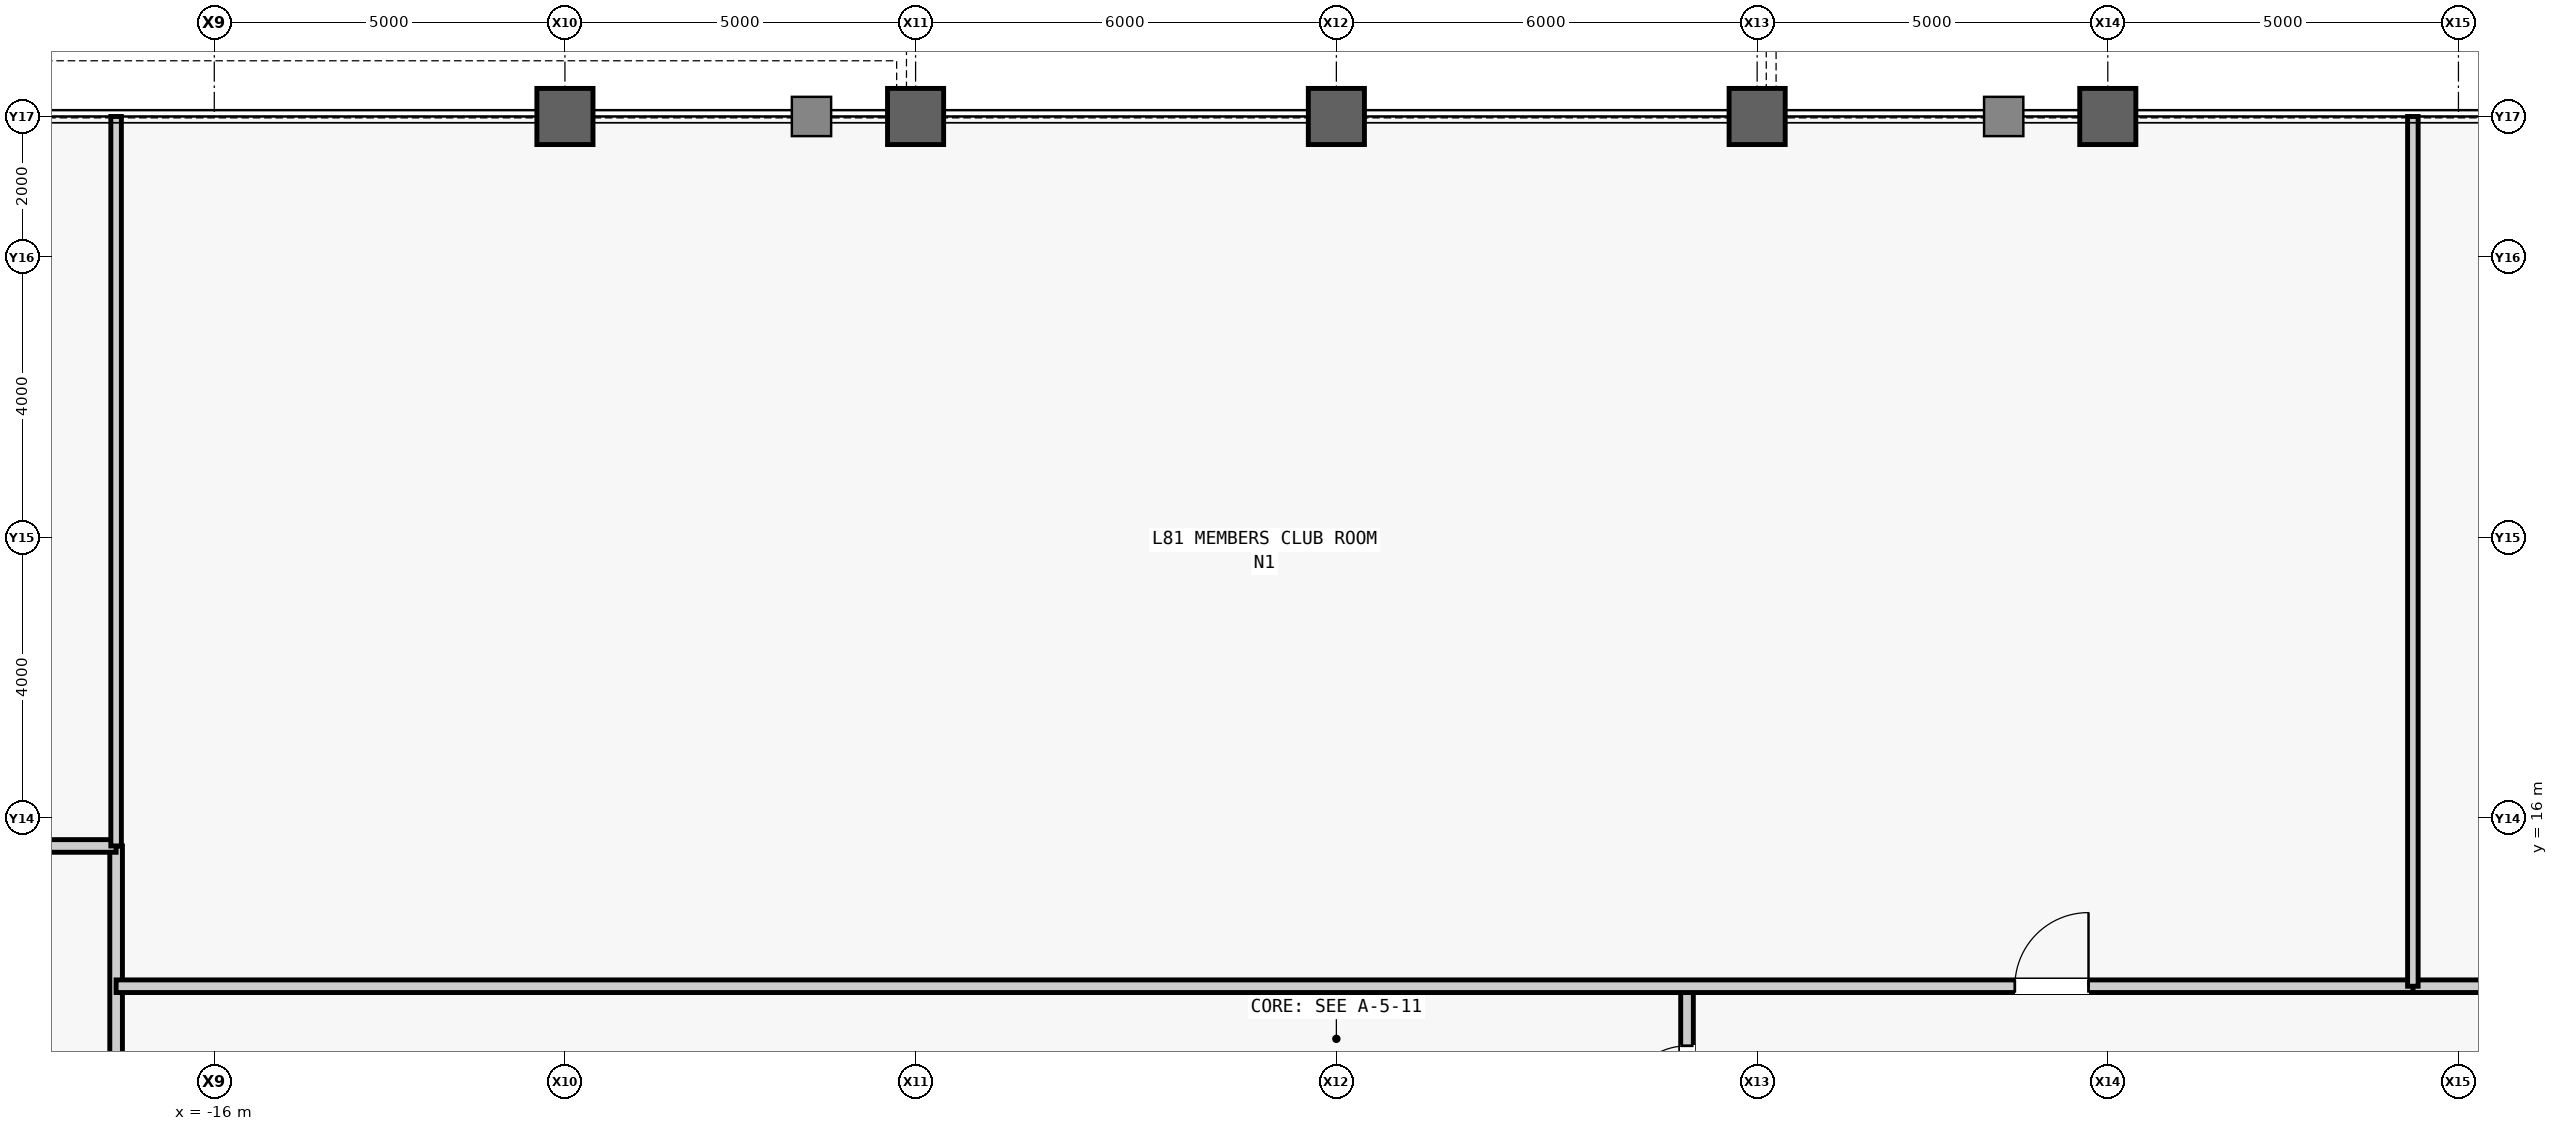
"""IFC4 building model, lengths in metres.
Left out: names, types, materials, properties, quantities, classifications, styles, units other than length and angle.
Written with IfcOpenShell. Run it as: python <this file> out.ifc"""

import sys

from ifc_helpers import new_model, si_unit, direction, frame, frame_2d, origin, origin_2d, place, context, subcontext, project, spatial, rectangle, hollow_rectangle, extrude, source, transform, mapped, element, fill, save


model = new_model("IFC4")
c1 = context("Model", 3, precision=1e-05, world=origin(), true_north=direction((0.0, 1.0)))
c2 = subcontext(c1, "Body", "Model", "MODEL_VIEW")
j1 = project(units=[si_unit("LENGTHUNIT", "METRE"), si_unit("PLANEANGLEUNIT", "RADIAN")], contexts=[c1])
p1 = place(None, origin())
s1 = spatial("IfcSite", under=j1, at=p1, CompositionType="ELEMENT")
p2 = place(p1, origin())
s2 = spatial("IfcBuilding", under=s1, at=p2, CompositionType="ELEMENT")
p3 = place(p2, frame((0.0, 0.0, 342.3)))
s3 = spatial("IfcBuildingStorey", under=s2, at=p3, CompositionType="ELEMENT", Elevation=342.3)
m1 = source(origin(), c2, "Body", "SweptSolid", [
    extrude(hollow_rectangle(XDim=0.8, YDim=0.8, WallThickness=0.045, at=origin_2d()), origin(), (0.0, 0.0, 1.0), 4.0),
])
for number, where, z_axis, x_axis in (
    (1, (-11.0, 26.0, 0.0), (0.0, 0.0, 1.0), (1.0, 0.0, 0.0)),
    (2, (-6.0, 26.0, 0.0), (0.0, 0.0, 1.0), (1.0, 0.0, 0.0)),
    (3, (0.0, 26.0, 0.0), (0.0, 0.0, 1.0), (1.0, 0.0, 0.0)),
    (4, (6.0, 26.0, 0.0), (0.0, 0.0, 1.0), (1.0, 0.0, 0.0)),
    (5, (11.0, 26.0, 0.0), (0.0, 0.0, 1.0), (1.0, 0.0, 0.0)),
):
    element("IfcColumn", number, at=place(p3, frame(where, z_axis=z_axis, x_axis=x_axis)), inside=s3, PredefinedType="COLUMN", context=c2, shape_type="MappedRepresentation", body=[
        mapped(m1, transform((0.0, 0.0, 0.0), scale=1.0)),
    ])
m2 = source(origin(), c2, "Body", "SweptSolid", [
    extrude(rectangle(XDim=8.4, YDim=0.18, at=frame_2d((4.2, 0.0))), origin(), (0.0, 0.0, 1.0), 3.7),
])
p4 = place(p3, frame((-17.4, 7.2, 0.0), z_axis=(0.0, 0.0, 1.0), x_axis=(0.0, 1.0, 0.0)))
e6 = element("IfcWall", 6, at=p4, inside=s3, PredefinedType="PARTITIONING", context=c2, shape_type="MappedRepresentation", body=[
    mapped(m2, transform((0.0, 0.0, 0.0), scale=1.0)),
])
m3 = source(origin(), c2, "Body", "SweptSolid", [
    extrude(rectangle(XDim=2.6, YDim=0.18, at=frame_2d((1.3, 0.0))), origin(), (0.0, 0.0, 1.0), 3.7),
])
p5 = place(p3, frame((5.0, 11.0, 0.0), z_axis=(0.0, 0.0, 1.0), x_axis=(0.0, 1.0, 0.0)))
e7 = element("IfcWall", 7, at=p5, inside=s3, PredefinedType="PARTITIONING", context=c2, shape_type="MappedRepresentation", body=[
    mapped(m3, transform((0.0, 0.0, 0.0), scale=1.0)),
])
m4 = source(origin(), c2, "Body", "SweptSolid", [
    extrude(rectangle(XDim=0.9, YDim=2.15, at=frame_2d((0.45, 1.075))), frame((0.0, 0.1, 0.0), z_axis=(0.0, -1.0, 0.0), x_axis=(1.0, 0.0, 0.0)), (0.0, 0.0, 1.0), 0.2),
])
p6 = place(p5, frame((0.85, 0.0, 0.0)))
e8 = element("IfcOpeningElement", 8, at=p6, cuts=e7, PredefinedType="OPENING", context=c2, shape_type="MappedRepresentation", body=[
    mapped(m4, transform((0.0, 0.0, 0.0), scale=1.0)),
])
m5 = source(origin(), c2, "Body", "SweptSolid", [
    extrude(rectangle(XDim=1.15, YDim=0.18, at=frame_2d((0.575, 0.0))), origin(), (0.0, 0.0, 1.0), 3.7),
])
p7 = place(p3, frame((-18.55, 15.6, 0.0), z_axis=(0.0, 0.0, 1.0), x_axis=(1.0, 0.0, 0.0)))
e9 = element("IfcWall", 9, at=p7, inside=s3, PredefinedType="PARTITIONING", context=c2, shape_type="MappedRepresentation", body=[
    mapped(m5, transform((0.0, 0.0, 0.0), scale=1.0)),
])
m6 = source(origin(), c2, "Body", "SweptSolid", [
    extrude(rectangle(XDim=2.4, YDim=0.18, at=frame_2d((1.2, 0.0))), origin(), (0.0, 0.0, 1.0), 3.7),
])
p8 = place(p3, frame((15.35, 13.6, 0.0), z_axis=(0.0, 0.0, 1.0), x_axis=(1.0, 0.0, 0.0)))
e10 = element("IfcWall", 10, at=p8, inside=s3, PredefinedType="PARTITIONING", context=c2, shape_type="MappedRepresentation", body=[
    mapped(m6, transform((0.0, 0.0, 0.0), scale=1.0)),
])
m7 = source(origin(), c2, "Body", "SweptSolid", [
    extrude(rectangle(XDim=32.75, YDim=0.18, at=frame_2d((16.375, 0.0))), origin(), (0.0, 0.0, 1.0), 3.7),
])
p9 = place(p3, frame((-17.4, 13.6, 0.0), z_axis=(0.0, 0.0, 1.0), x_axis=(1.0, 0.0, 0.0)))
e11 = element("IfcWall", 11, at=p9, inside=s3, PredefinedType="PARTITIONING", context=c2, shape_type="MappedRepresentation", body=[
    mapped(m7, transform((0.0, 0.0, 0.0), scale=1.0)),
])
m8 = source(origin(), c2, "Body", "SweptSolid", [
    extrude(rectangle(XDim=1.05, YDim=2.2, at=frame_2d((0.525, 1.1))), frame((0.0, 0.1, 0.0), z_axis=(0.0, -1.0, 0.0), x_axis=(1.0, 0.0, 0.0)), (0.0, 0.0, 1.0), 0.2),
])
p10 = place(p9, frame((27.075, 0.0, 0.0)))
e12 = element("IfcOpeningElement", 12, at=p10, cuts=e11, PredefinedType="OPENING", context=c2, shape_type="MappedRepresentation", body=[
    mapped(m8, transform((0.0, 0.0, 0.0), scale=1.0)),
])
m9 = source(origin(), c2, "Body", "SweptSolid", [
    extrude(rectangle(XDim=10.4, YDim=0.15, at=frame_2d((5.2, 0.0))), origin(), (0.0, 0.0, 1.0), 3.7),
])
p11 = place(p3, frame((-17.4, 15.6, 0.0), z_axis=(0.0, 0.0, 1.0), x_axis=(0.0, 1.0, 0.0)))
e13 = element("IfcWall", 13, at=p11, inside=s3, PredefinedType="PARTITIONING", context=c2, shape_type="MappedRepresentation", body=[
    mapped(m9, transform((0.0, 0.0, 0.0), scale=1.0)),
])
m10 = source(origin(), c2, "Body", "SweptSolid", [
    extrude(rectangle(XDim=12.4, YDim=0.15, at=frame_2d((6.2, 0.0))), origin(), (0.0, 0.0, 1.0), 3.7),
])
p12 = place(p3, frame((15.35, 13.6, 0.0), z_axis=(0.0, 0.0, 1.0), x_axis=(0.0, 1.0, 0.0)))
e14 = element("IfcWall", 14, at=p12, inside=s3, PredefinedType="PARTITIONING", context=c2, shape_type="MappedRepresentation", body=[
    mapped(m10, transform((0.0, 0.0, 0.0), scale=1.0)),
])
m11 = source(origin(), c2, "Body", "SweptSolid", [
    extrude(rectangle(XDim=0.9, YDim=2.15, at=frame_2d((0.45, 1.075))), frame((0.0, 0.025, 0.0), z_axis=(0.0, -1.0, 0.0), x_axis=(1.0, 0.0, 0.0)), (0.0, 0.0, 1.0), 0.05),
])
p13 = place(p6, origin())
e15 = element("IfcDoor", 15, at=p13, inside=s3, OperationType="SINGLE_SWING_LEFT", PredefinedType="DOOR", context=c2, shape_type="MappedRepresentation", body=[
    mapped(m11, transform((0.0, 0.0, 0.0), scale=1.0)),
])
fill(e8, e15)
m12 = source(origin(), c2, "Body", "SweptSolid", [
    extrude(rectangle(XDim=1.05, YDim=2.2, at=frame_2d((0.525, 1.1))), frame((0.0, 0.025, 0.0), z_axis=(0.0, -1.0, 0.0), x_axis=(1.0, 0.0, 0.0)), (0.0, 0.0, 1.0), 0.05),
])
p14 = place(p10, origin())
e16 = element("IfcDoor", 16, at=p14, inside=s3, OperationType="SINGLE_SWING_RIGHT", PredefinedType="DOOR", context=c2, shape_type="MappedRepresentation", body=[
    mapped(m12, transform((0.0, 0.0, 0.0), scale=1.0)),
])
fill(e12, e16)
save(model, sys.argv[1])
